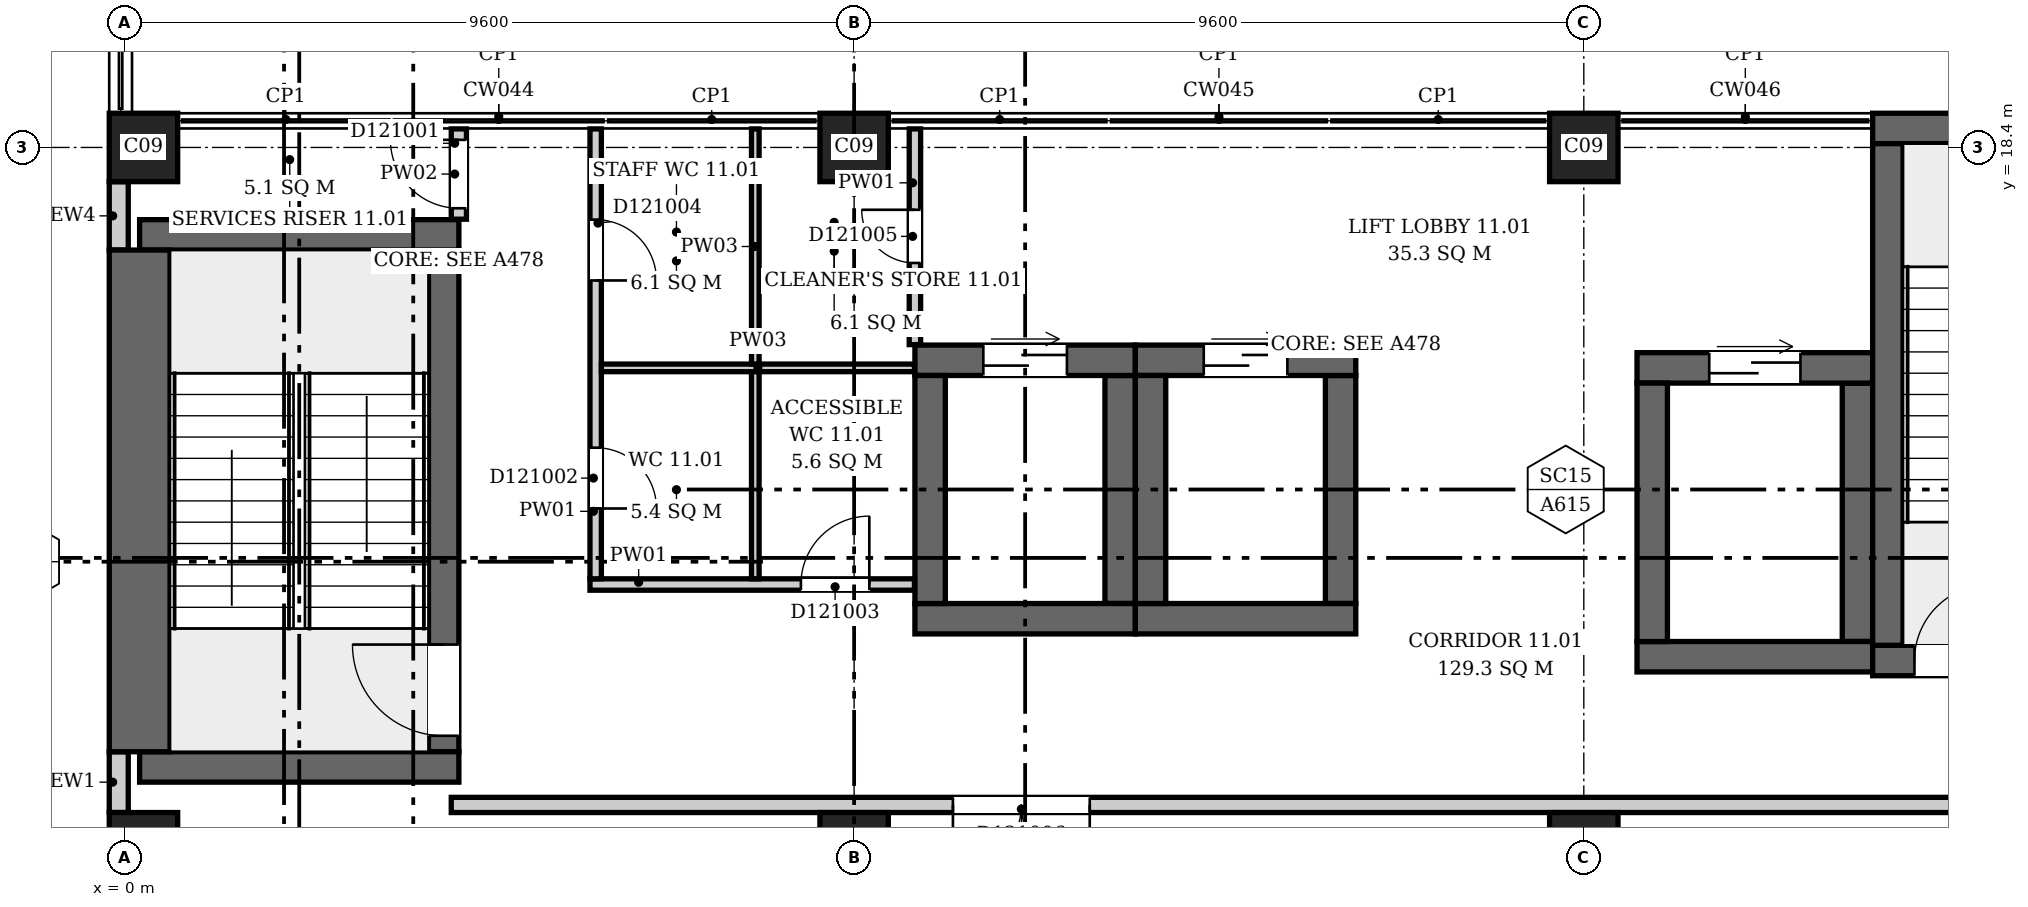
"""IFC4 building model, lengths in metres.
Left out: names, types, materials, properties, quantities, classifications, styles, units other than length and angle.
Written with IfcOpenShell. Run it as: python <this file> out.ifc"""

import sys

from ifc_helpers import new_model, si_unit, direction, frame, frame_2d, origin, origin_2d, place, context, subcontext, project, spatial, rectangle, extrude, element, fill, save


model = new_model("IFC4")
c1 = context("Model", 3, precision=1e-05, world=origin(), true_north=direction((0.0, 1.0)))
c2 = subcontext(c1, "Body", "Model", "MODEL_VIEW")
j1 = project(units=[si_unit("LENGTHUNIT", "METRE"), si_unit("PLANEANGLEUNIT", "RADIAN")], contexts=[c1])
p1 = place(None, origin())
s1 = spatial("IfcSite", under=j1, at=p1, CompositionType="ELEMENT")
p2 = place(p1, origin())
s2 = spatial("IfcBuilding", under=s1, at=p2, CompositionType="ELEMENT")
p3 = place(p2, frame((0.0, 0.0, 57.1)))
s3 = spatial("IfcBuildingStorey", under=s2, at=p3, CompositionType="ELEMENT", Elevation=57.1)
for number, where, z_axis, x_axis in (
    (1, (0.2, 10.25, 0.0), (0.0, 0.0, 1.0), (1.0, 0.0, 0.0)),
    (2, (0.2, 17.25, 0.0), (0.0, 0.0, 1.0), (1.0, 0.0, 0.0)),
):
    element("IfcWall", number, at=place(p3, frame(where, z_axis=z_axis, x_axis=x_axis)), inside=s3, PredefinedType="SHEAR", context=c2, shape_type="SweptSolid", body=[
        extrude(rectangle(XDim=4.2, YDim=0.4, at=frame_2d((2.1, 0.0))), origin(), (0.0, 0.0, 1.0), 4.2),
    ])
p4 = place(p3, frame((0.2, 10.45, 0.0), z_axis=(0.0, 0.0, 1.0), x_axis=(0.0, 1.0, 0.0)))
e3 = element("IfcWall", 3, at=p4, inside=s3, PredefinedType="SHEAR", context=c2, shape_type="SweptSolid", body=[
    extrude(rectangle(XDim=6.6, YDim=0.8, at=frame_2d((3.3, 0.0))), origin(), (0.0, 0.0, 1.0), 4.2),
])
p5 = place(p3, frame((4.2, 10.45, 0.0), z_axis=(0.0, 0.0, 1.0), x_axis=(0.0, 1.0, 0.0)))
e4 = element("IfcWall", 4, at=p5, inside=s3, PredefinedType="SHEAR", context=c2, shape_type="SweptSolid", body=[
    extrude(rectangle(XDim=6.6, YDim=0.4, at=frame_2d((3.3, 0.0))), origin(), (0.0, 0.0, 1.0), 4.2),
])
p6 = place(p5, frame((0.21, 0.0, 0.0)))
e5 = element("IfcOpeningElement", 5, at=p6, cuts=e4, PredefinedType="OPENING", context=c2, shape_type="SweptSolid", body=[
    extrude(rectangle(XDim=1.2, YDim=2.1, at=frame_2d((0.6, 1.05))), frame((0.0, 0.21, 0.0), z_axis=(0.0, -1.0, 0.0), x_axis=(1.0, 0.0, 0.0)), (0.0, 0.0, 1.0), 0.42),
])
p7 = place(p3, frame((23.0, 11.65, 0.0), z_axis=(0.0, 0.0, 1.0), x_axis=(1.0, 0.0, 0.0)))
e6 = element("IfcWall", 6, at=p7, inside=s3, PredefinedType="SHEAR", context=c2, shape_type="SweptSolid", body=[
    extrude(rectangle(XDim=4.2, YDim=0.4, at=frame_2d((2.1, 0.0))), origin(), (0.0, 0.0, 1.0), 4.2),
])
p8 = place(p7, frame((0.55, 0.0, 0.0)))
e7 = element("IfcOpeningElement", 7, at=p8, cuts=e6, PredefinedType="OPENING", context=c2, shape_type="SweptSolid", body=[
    extrude(rectangle(XDim=1.0, YDim=2.1, at=frame_2d((0.5, 1.05))), frame((0.0, 0.21, 0.0), z_axis=(0.0, -1.0, 0.0), x_axis=(1.0, 0.0, 0.0)), (0.0, 0.0, 1.0), 0.42),
])
p9 = place(p7, frame((2.65, 0.0, 0.0)))
e8 = element("IfcOpeningElement", 8, at=p9, cuts=e6, PredefinedType="OPENING", context=c2, shape_type="SweptSolid", body=[
    extrude(rectangle(XDim=1.0, YDim=2.1, at=frame_2d((0.5, 1.05))), frame((0.0, 0.21, 0.0), z_axis=(0.0, -1.0, 0.0), x_axis=(1.0, 0.0, 0.0)), (0.0, 0.0, 1.0), 0.42),
])
p10 = place(p3, frame((23.0, 18.65, 0.0), z_axis=(0.0, 0.0, 1.0), x_axis=(1.0, 0.0, 0.0)))
e9 = element("IfcWall", 9, at=p10, inside=s3, PredefinedType="SHEAR", context=c2, shape_type="SweptSolid", body=[
    extrude(rectangle(XDim=4.2, YDim=0.4, at=frame_2d((2.1, 0.0))), origin(), (0.0, 0.0, 1.0), 4.2),
])
p11 = place(p3, frame((23.2, 11.85, 0.0), z_axis=(0.0, 0.0, 1.0), x_axis=(0.0, 1.0, 0.0)))
e10 = element("IfcWall", 10, at=p11, inside=s3, PredefinedType="SHEAR", context=c2, shape_type="SweptSolid", body=[
    extrude(rectangle(XDim=6.6, YDim=0.4, at=frame_2d((3.3, 0.0))), origin(), (0.0, 0.0, 1.0), 4.2),
])
p12 = place(p3, frame((10.4, 12.2, 0.0), z_axis=(0.0, 0.0, 1.0), x_axis=(1.0, 0.0, 0.0)))
e11 = element("IfcWall", 11, at=p12, inside=s3, PredefinedType="SHEAR", context=c2, shape_type="SweptSolid", body=[
    extrude(rectangle(XDim=2.9, YDim=0.4, at=frame_2d((1.45, 0.0))), origin(), (0.0, 0.0, 1.0), 4.2),
])
p13 = place(p3, frame((10.4, 15.6, 0.0), z_axis=(0.0, 0.0, 1.0), x_axis=(1.0, 0.0, 0.0)))
e12 = element("IfcWall", 12, at=p13, inside=s3, PredefinedType="SHEAR", context=c2, shape_type="SweptSolid", body=[
    extrude(rectangle(XDim=2.9, YDim=0.4, at=frame_2d((1.45, 0.0))), origin(), (0.0, 0.0, 1.0), 4.2),
])
p14 = place(p13, frame((0.9, 0.0, 0.0)))
e13 = element("IfcOpeningElement", 13, at=p14, cuts=e12, PredefinedType="OPENING", context=c2, shape_type="SweptSolid", body=[
    extrude(rectangle(XDim=1.1, YDim=2.1, at=frame_2d((0.55, 1.05))), frame((0.0, 0.21, 0.0), z_axis=(0.0, -1.0, 0.0), x_axis=(1.0, 0.0, 0.0)), (0.0, 0.0, 1.0), 0.42),
])
for number, where, z_axis, x_axis in (
    (14, (10.6, 12.4, 0.0), (0.0, 0.0, 1.0), (0.0, 1.0, 0.0)),
    (15, (13.1, 12.4, 0.0), (0.0, 0.0, 1.0), (0.0, 1.0, 0.0)),
):
    element("IfcWall", number, at=place(p3, frame(where, z_axis=z_axis, x_axis=x_axis)), inside=s3, PredefinedType="SHEAR", context=c2, shape_type="SweptSolid", body=[
        extrude(rectangle(XDim=3.0, YDim=0.4, at=frame_2d((1.5, 0.0))), origin(), (0.0, 0.0, 1.0), 4.2),
    ])
p15 = place(p3, frame((13.3, 12.2, 0.0), z_axis=(0.0, 0.0, 1.0), x_axis=(1.0, 0.0, 0.0)))
e16 = element("IfcWall", 16, at=p15, inside=s3, PredefinedType="SHEAR", context=c2, shape_type="SweptSolid", body=[
    extrude(rectangle(XDim=2.9, YDim=0.4, at=frame_2d((1.45, 0.0))), origin(), (0.0, 0.0, 1.0), 4.2),
])
p16 = place(p3, frame((13.3, 15.6, 0.0), z_axis=(0.0, 0.0, 1.0), x_axis=(1.0, 0.0, 0.0)))
e17 = element("IfcWall", 17, at=p16, inside=s3, PredefinedType="SHEAR", context=c2, shape_type="SweptSolid", body=[
    extrude(rectangle(XDim=2.9, YDim=0.4, at=frame_2d((1.45, 0.0))), origin(), (0.0, 0.0, 1.0), 4.2),
])
p17 = place(p16, frame((0.9, 0.0, 0.0)))
e18 = element("IfcOpeningElement", 18, at=p17, cuts=e17, PredefinedType="OPENING", context=c2, shape_type="SweptSolid", body=[
    extrude(rectangle(XDim=1.1, YDim=2.1, at=frame_2d((0.55, 1.05))), frame((0.0, 0.21, 0.0), z_axis=(0.0, -1.0, 0.0), x_axis=(1.0, 0.0, 0.0)), (0.0, 0.0, 1.0), 0.42),
])
for number, where, z_axis, x_axis in (
    (19, (13.5, 12.4, 0.0), (0.0, 0.0, 1.0), (0.0, 1.0, 0.0)),
    (20, (16.0, 12.4, 0.0), (0.0, 0.0, 1.0), (0.0, 1.0, 0.0)),
):
    element("IfcWall", number, at=place(p3, frame(where, z_axis=z_axis, x_axis=x_axis)), inside=s3, PredefinedType="SHEAR", context=c2, shape_type="SweptSolid", body=[
        extrude(rectangle(XDim=3.0, YDim=0.4, at=frame_2d((1.5, 0.0))), origin(), (0.0, 0.0, 1.0), 4.2),
    ])
p18 = place(p3, frame((19.9, 11.7, 0.0), z_axis=(0.0, 0.0, 1.0), x_axis=(1.0, 0.0, 0.0)))
e21 = element("IfcWall", 21, at=p18, inside=s3, PredefinedType="SHEAR", context=c2, shape_type="SweptSolid", body=[
    extrude(rectangle(XDim=3.1, YDim=0.4, at=frame_2d((1.55, 0.0))), origin(), (0.0, 0.0, 1.0), 4.2),
])
p19 = place(p3, frame((19.9, 15.5, 0.0), z_axis=(0.0, 0.0, 1.0), x_axis=(1.0, 0.0, 0.0)))
e22 = element("IfcWall", 22, at=p19, inside=s3, PredefinedType="SHEAR", context=c2, shape_type="SweptSolid", body=[
    extrude(rectangle(XDim=3.1, YDim=0.4, at=frame_2d((1.55, 0.0))), origin(), (0.0, 0.0, 1.0), 4.2),
])
p20 = place(p19, frame((0.95, 0.0, 0.0)))
e23 = element("IfcOpeningElement", 23, at=p20, cuts=e22, PredefinedType="OPENING", context=c2, shape_type="SweptSolid", body=[
    extrude(rectangle(XDim=1.2, YDim=2.1, at=frame_2d((0.6, 1.05))), frame((0.0, 0.21, 0.0), z_axis=(0.0, -1.0, 0.0), x_axis=(1.0, 0.0, 0.0)), (0.0, 0.0, 1.0), 0.42),
])
for number, where, z_axis, x_axis in (
    (24, (20.1, 11.9, 0.0), (0.0, 0.0, 1.0), (0.0, 1.0, 0.0)),
    (25, (22.8, 11.9, 0.0), (0.0, 0.0, 1.0), (0.0, 1.0, 0.0)),
):
    element("IfcWall", number, at=place(p3, frame(where, z_axis=z_axis, x_axis=x_axis)), inside=s3, PredefinedType="SHEAR", context=c2, shape_type="SweptSolid", body=[
        extrude(rectangle(XDim=3.4, YDim=0.4, at=frame_2d((1.7, 0.0))), origin(), (0.0, 0.0, 1.0), 4.2),
    ])
for number, where, z_axis, x_axis in (
    (26, (0.25, 9.2, 0.0), (0.0, 0.0, 1.0), (1.0, 0.0, 0.0)),
    (27, (9.6, 9.2, 0.0), (0.0, 0.0, 1.0), (1.0, 0.0, 0.0)),
    (28, (19.2, 9.2, 0.0), (0.0, 0.0, 1.0), (1.0, 0.0, 0.0)),
    (29, (0.25, 18.4, 0.0), (0.0, 0.0, 1.0), (1.0, 0.0, 0.0)),
    (30, (9.6, 18.4, 0.0), (0.0, 0.0, 1.0), (1.0, 0.0, 0.0)),
    (31, (19.2, 18.4, 0.0), (0.0, 0.0, 1.0), (1.0, 0.0, 0.0)),
):
    element("IfcColumn", number, at=place(p3, frame(where, z_axis=z_axis, x_axis=x_axis)), inside=s3, PredefinedType="COLUMN", context=c2, shape_type="SweptSolid", body=[
        extrude(rectangle(XDim=0.9, YDim=0.9, at=origin_2d()), origin(), (0.0, 0.0, 1.0), 4.2),
    ])
p21 = place(p3, frame((-0.074, 10.45, 0.0), z_axis=(0.0, 0.0, 1.0), x_axis=(0.0, -1.0, 0.0)))
e32 = element("IfcWall", 32, at=p21, inside=s3, PredefinedType="ELEMENTEDWALL", context=c2, shape_type="SweptSolid", body=[
    extrude(rectangle(XDim=0.8, YDim=0.25, at=frame_2d((0.4, 0.0))), origin(), (0.0, 0.0, 1.0), 3.9),
])
p22 = place(p3, frame((-0.074, 17.95, 0.0), z_axis=(0.0, 0.0, 1.0), x_axis=(0.0, -1.0, 0.0)))
e33 = element("IfcWall", 33, at=p22, inside=s3, PredefinedType="ELEMENTEDWALL", context=c2, shape_type="SweptSolid", body=[
    extrude(rectangle(XDim=0.9, YDim=0.25, at=frame_2d((0.45, 0.0))), origin(), (0.0, 0.0, 1.0), 3.9),
])
p23 = place(p3, frame((4.3, 9.75, 0.0), z_axis=(0.0, 0.0, 1.0), x_axis=(1.0, 0.0, 0.0)))
e34 = element("IfcWall", 34, at=p23, inside=s3, PredefinedType="PARTITIONING", context=c2, shape_type="SweptSolid", body=[
    extrude(rectangle(XDim=43.894, YDim=0.2, at=frame_2d((21.947, 0.0))), origin(), (0.0, 0.0, 1.0), 3.9),
])
p24 = place(p23, frame((6.6, 0.0, 0.0)))
e35 = element("IfcOpeningElement", 35, at=p24, cuts=e34, PredefinedType="OPENING", context=c2, shape_type="SweptSolid", body=[
    extrude(rectangle(XDim=1.8, YDim=2.1, at=frame_2d((0.9, 1.05))), frame((0.0, 0.11, 0.0), z_axis=(0.0, -1.0, 0.0), x_axis=(1.0, 0.0, 0.0)), (0.0, 0.0, 1.0), 0.22),
])
p25 = place(p23, frame((22.25, 0.0, 0.0)))
e36 = element("IfcOpeningElement", 36, at=p25, cuts=e34, PredefinedType="OPENING", context=c2, shape_type="SweptSolid", body=[
    extrude(rectangle(XDim=1.8, YDim=2.1, at=frame_2d((0.9, 1.05))), frame((0.0, 0.11, 0.0), z_axis=(0.0, -1.0, 0.0), x_axis=(1.0, 0.0, 0.0)), (0.0, 0.0, 1.0), 0.22),
])
p26 = place(p23, frame((38.4, 0.0, 0.0)))
e37 = element("IfcOpeningElement", 37, at=p26, cuts=e34, PredefinedType="OPENING", context=c2, shape_type="SweptSolid", body=[
    extrude(rectangle(XDim=1.2, YDim=2.1, at=frame_2d((0.6, 1.05))), frame((0.0, 0.11, 0.0), z_axis=(0.0, -1.0, 0.0), x_axis=(1.0, 0.0, 0.0)), (0.0, 0.0, 1.0), 0.22),
])
p27 = place(p3, frame((4.4, 17.456, 0.0), z_axis=(0.0, 0.0, 1.0), x_axis=(0.0, 1.0, 0.0)))
e38 = element("IfcWall", 38, at=p27, inside=s3, PredefinedType="PARTITIONING", context=c2, shape_type="SweptSolid", body=[
    extrude(rectangle(XDim=1.188, YDim=0.2, at=frame_2d((0.594, 0.0))), origin(), (0.0, 0.0, 1.0), 3.9),
])
p28 = place(p27, frame((0.144, 0.0, 0.0)))
e39 = element("IfcOpeningElement", 39, at=p28, cuts=e38, PredefinedType="OPENING", context=c2, shape_type="SweptSolid", body=[
    extrude(rectangle(XDim=0.9, YDim=2.1, at=frame_2d((0.45, 1.05))), frame((0.0, 0.11, 0.0), z_axis=(0.0, -1.0, 0.0), x_axis=(1.0, 0.0, 0.0)), (0.0, 0.0, 1.0), 0.22),
])
p29 = place(p3, frame((6.125, 12.65, 0.0), z_axis=(0.0, 0.0, 1.0), x_axis=(1.0, 0.0, 0.0)))
e40 = element("IfcWall", 40, at=p29, inside=s3, PredefinedType="PARTITIONING", context=c2, shape_type="SweptSolid", body=[
    extrude(rectangle(XDim=4.269, YDim=0.15, at=frame_2d((2.135, 0.0))), origin(), (0.0, 0.0, 1.0), 3.9),
])
p30 = place(p29, frame((2.775, 0.0, 0.0)))
e41 = element("IfcOpeningElement", 41, at=p30, cuts=e40, PredefinedType="OPENING", context=c2, shape_type="SweptSolid", body=[
    extrude(rectangle(XDim=0.9, YDim=2.1, at=frame_2d((0.45, 1.05))), frame((0.0, 0.085, 0.0), z_axis=(0.0, -1.0, 0.0), x_axis=(1.0, 0.0, 0.0)), (0.0, 0.0, 1.0), 0.17),
])
p31 = place(p3, frame((6.2, 12.725, 0.0), z_axis=(0.0, 0.0, 1.0), x_axis=(0.0, 1.0, 0.0)))
e42 = element("IfcWall", 42, at=p31, inside=s3, PredefinedType="PARTITIONING", context=c2, shape_type="SweptSolid", body=[
    extrude(rectangle(XDim=5.919, YDim=0.15, at=frame_2d((2.959, 0.0))), origin(), (0.0, 0.0, 1.0), 3.9),
])
p32 = place(p31, frame((0.925, 0.0, 0.0)))
e43 = element("IfcOpeningElement", 43, at=p32, cuts=e42, PredefinedType="OPENING", context=c2, shape_type="SweptSolid", body=[
    extrude(rectangle(XDim=0.8, YDim=2.1, at=frame_2d((0.4, 1.05))), frame((0.0, 0.085, 0.0), z_axis=(0.0, -1.0, 0.0), x_axis=(1.0, 0.0, 0.0)), (0.0, 0.0, 1.0), 0.17),
])
p33 = place(p31, frame((3.925, 0.0, 0.0)))
e44 = element("IfcOpeningElement", 44, at=p33, cuts=e42, PredefinedType="OPENING", context=c2, shape_type="SweptSolid", body=[
    extrude(rectangle(XDim=0.8, YDim=2.1, at=frame_2d((0.4, 1.05))), frame((0.0, 0.085, 0.0), z_axis=(0.0, -1.0, 0.0), x_axis=(1.0, 0.0, 0.0)), (0.0, 0.0, 1.0), 0.17),
])
p34 = place(p3, frame((6.275, 15.5, 0.0), z_axis=(0.0, 0.0, 1.0), x_axis=(1.0, 0.0, 0.0)))
e45 = element("IfcWall", 45, at=p34, inside=s3, PredefinedType="PARTITIONING", context=c2, shape_type="SweptSolid", body=[
    extrude(rectangle(XDim=4.119, YDim=0.1, at=frame_2d((2.06, 0.0))), origin(), (0.0, 0.0, 1.0), 3.9),
])
p35 = place(p3, frame((8.3, 12.725, 0.0), z_axis=(0.0, 0.0, 1.0), x_axis=(0.0, 1.0, 0.0)))
e46 = element("IfcWall", 46, at=p35, inside=s3, PredefinedType="PARTITIONING", context=c2, shape_type="SweptSolid", body=[
    extrude(rectangle(XDim=2.725, YDim=0.1, at=frame_2d((1.362, 0.0))), origin(), (0.0, 0.0, 1.0), 3.9),
])
p36 = place(p3, frame((8.3, 15.55, 0.0), z_axis=(0.0, 0.0, 1.0), x_axis=(0.0, 1.0, 0.0)))
e47 = element("IfcWall", 47, at=p36, inside=s3, PredefinedType="PARTITIONING", context=c2, shape_type="SweptSolid", body=[
    extrude(rectangle(XDim=3.094, YDim=0.1, at=frame_2d((1.547, 0.0))), origin(), (0.0, 0.0, 1.0), 3.9),
])
p37 = place(p3, frame((10.4, 15.806, 0.0), z_axis=(0.0, 0.0, 1.0), x_axis=(0.0, 1.0, 0.0)))
e48 = element("IfcWall", 48, at=p37, inside=s3, PredefinedType="PARTITIONING", context=c2, shape_type="SweptSolid", body=[
    extrude(rectangle(XDim=2.838, YDim=0.15, at=frame_2d((1.419, 0.0))), origin(), (0.0, 0.0, 1.0), 3.9),
])
p38 = place(p37, frame((1.074, 0.0, 0.0)))
e49 = element("IfcOpeningElement", 49, at=p38, cuts=e48, PredefinedType="OPENING", context=c2, shape_type="SweptSolid", body=[
    extrude(rectangle(XDim=0.7, YDim=2.1, at=frame_2d((0.35, 1.05))), frame((0.0, 0.085, 0.0), z_axis=(0.0, -1.0, 0.0), x_axis=(1.0, 0.0, 0.0)), (0.0, 0.0, 1.0), 0.17),
])
p39 = place(p6, origin())
e50 = element("IfcDoor", 50, at=p39, inside=s3, OperationType="SINGLE_SWING_RIGHT", PredefinedType="DOOR", context=c2, shape_type="SweptSolid", body=[
    extrude(rectangle(XDim=1.2, YDim=2.1, at=frame_2d((0.6, 1.05))), frame((0.0, 0.025, 0.0), z_axis=(0.0, -1.0, 0.0), x_axis=(1.0, 0.0, 0.0)), (0.0, 0.0, 1.0), 0.05),
])
fill(e5, e50)
p40 = place(p8, origin())
e51 = element("IfcDoor", 51, at=p40, inside=s3, OperationType="SINGLE_SWING_RIGHT", PredefinedType="DOOR", context=c2, shape_type="SweptSolid", body=[
    extrude(rectangle(XDim=1.0, YDim=2.1, at=frame_2d((0.5, 1.05))), frame((0.0, 0.025, 0.0), z_axis=(0.0, -1.0, 0.0), x_axis=(1.0, 0.0, 0.0)), (0.0, 0.0, 1.0), 0.05),
])
fill(e7, e51)
p41 = place(p14, origin())
e52 = element("IfcDoor", 52, at=p41, inside=s3, OperationType="DOUBLE_DOOR_SLIDING", PredefinedType="DOOR", context=c2, shape_type="SweptSolid", body=[
    extrude(rectangle(XDim=1.1, YDim=2.1, at=frame_2d((0.55, 1.05))), frame((0.0, 0.025, 0.0), z_axis=(0.0, -1.0, 0.0), x_axis=(1.0, 0.0, 0.0)), (0.0, 0.0, 1.0), 0.05),
])
fill(e13, e52)
p42 = place(p17, origin())
e53 = element("IfcDoor", 53, at=p42, inside=s3, OperationType="DOUBLE_DOOR_SLIDING", PredefinedType="DOOR", context=c2, shape_type="SweptSolid", body=[
    extrude(rectangle(XDim=1.1, YDim=2.1, at=frame_2d((0.55, 1.05))), frame((0.0, 0.025, 0.0), z_axis=(0.0, -1.0, 0.0), x_axis=(1.0, 0.0, 0.0)), (0.0, 0.0, 1.0), 0.05),
])
fill(e18, e53)
p43 = place(p20, origin())
e54 = element("IfcDoor", 54, at=p43, inside=s3, OperationType="DOUBLE_DOOR_SLIDING", PredefinedType="DOOR", context=c2, shape_type="SweptSolid", body=[
    extrude(rectangle(XDim=1.2, YDim=2.1, at=frame_2d((0.6, 1.05))), frame((0.0, 0.025, 0.0), z_axis=(0.0, -1.0, 0.0), x_axis=(1.0, 0.0, 0.0)), (0.0, 0.0, 1.0), 0.05),
])
fill(e23, e54)
p44 = place(p28, origin())
e55 = element("IfcDoor", 55, at=p44, inside=s3, OperationType="SINGLE_SWING_LEFT", PredefinedType="DOOR", context=c2, shape_type="SweptSolid", body=[
    extrude(rectangle(XDim=0.9, YDim=2.1, at=frame_2d((0.45, 1.05))), frame((0.0, 0.025, 0.0), z_axis=(0.0, -1.0, 0.0), x_axis=(1.0, 0.0, 0.0)), (0.0, 0.0, 1.0), 0.05),
])
fill(e39, e55)
p45 = place(p32, origin())
e56 = element("IfcDoor", 56, at=p45, inside=s3, OperationType="SINGLE_SWING_LEFT", PredefinedType="DOOR", context=c2, shape_type="SweptSolid", body=[
    extrude(rectangle(XDim=0.8, YDim=2.1, at=frame_2d((0.4, 1.05))), frame((0.0, 0.025, 0.0), z_axis=(0.0, -1.0, 0.0), x_axis=(1.0, 0.0, 0.0)), (0.0, 0.0, 1.0), 0.05),
])
fill(e43, e56)
p46 = place(p30, origin())
e57 = element("IfcDoor", 57, at=p46, inside=s3, OperationType="SINGLE_SWING_RIGHT", PredefinedType="DOOR", context=c2, shape_type="SweptSolid", body=[
    extrude(rectangle(XDim=0.9, YDim=2.1, at=frame_2d((0.45, 1.05))), frame((0.0, 0.025, 0.0), z_axis=(0.0, -1.0, 0.0), x_axis=(1.0, 0.0, 0.0)), (0.0, 0.0, 1.0), 0.05),
])
fill(e41, e57)
p47 = place(p33, origin())
e58 = element("IfcDoor", 58, at=p47, inside=s3, OperationType="SINGLE_SWING_LEFT", PredefinedType="DOOR", context=c2, shape_type="SweptSolid", body=[
    extrude(rectangle(XDim=0.8, YDim=2.1, at=frame_2d((0.4, 1.05))), frame((0.0, 0.025, 0.0), z_axis=(0.0, -1.0, 0.0), x_axis=(1.0, 0.0, 0.0)), (0.0, 0.0, 1.0), 0.05),
])
fill(e44, e58)
p48 = place(p38, origin())
e59 = element("IfcDoor", 59, at=p48, inside=s3, OperationType="SINGLE_SWING_LEFT", PredefinedType="DOOR", context=c2, shape_type="SweptSolid", body=[
    extrude(rectangle(XDim=0.7, YDim=2.1, at=frame_2d((0.35, 1.05))), frame((0.0, 0.025, 0.0), z_axis=(0.0, -1.0, 0.0), x_axis=(1.0, 0.0, 0.0)), (0.0, 0.0, 1.0), 0.05),
])
fill(e49, e59)
p49 = place(p24, origin())
e60 = element("IfcDoor", 60, at=p49, inside=s3, OperationType="DOUBLE_DOOR_SINGLE_SWING", PredefinedType="DOOR", context=c2, shape_type="SweptSolid", body=[
    extrude(rectangle(XDim=1.8, YDim=2.1, at=frame_2d((0.9, 1.05))), frame((0.0, 0.025, 0.0), z_axis=(0.0, -1.0, 0.0), x_axis=(1.0, 0.0, 0.0)), (0.0, 0.0, 1.0), 0.05),
])
fill(e35, e60)
save(model, sys.argv[1])
